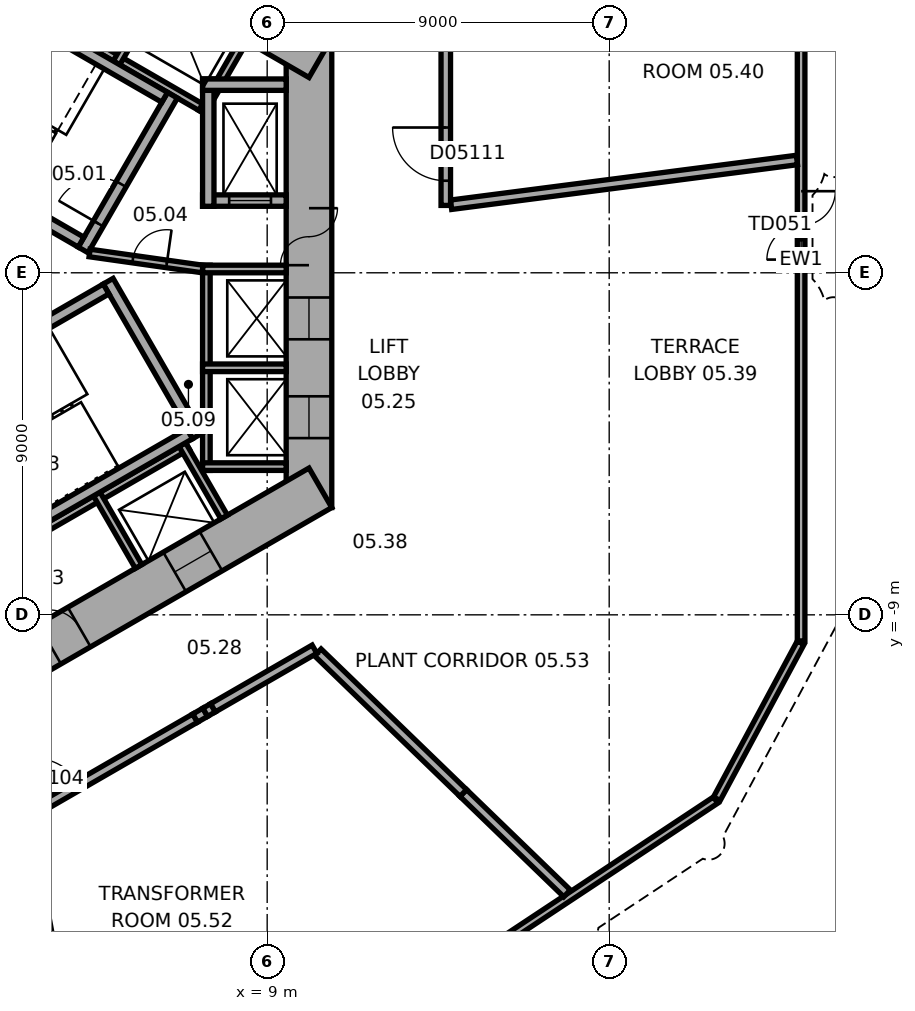
"""IFC4 building model, lengths in metres.
Left out: names, types, materials, properties, quantities, classifications, styles, units other than length and angle.
Written with IfcOpenShell. Run it as: python <this file> out.ifc"""

import sys

from ifc_helpers import new_model, si_unit, direction, frame, frame_2d, origin, place, context, subcontext, project, spatial, rectangle, extrude, element, fill, save


model = new_model("IFC4")
c1 = context("Model", 3, precision=1e-05, world=origin(), true_north=direction((0.0, 1.0)))
c2 = subcontext(c1, "Body", "Model", "MODEL_VIEW")
j1 = project(units=[si_unit("LENGTHUNIT", "METRE"), si_unit("PLANEANGLEUNIT", "RADIAN")], contexts=[c1])
p1 = place(None, origin())
s1 = spatial("IfcSite", under=j1, at=p1, CompositionType="ELEMENT")
p2 = place(p1, origin())
s2 = spatial("IfcBuilding", under=s1, at=p2, CompositionType="ELEMENT")
p3 = place(p2, frame((0.0, 0.0, 34.5)))
s3 = spatial("IfcBuildingStorey", under=s2, at=p3, CompositionType="ELEMENT", Elevation=34.5)
p4 = place(p3, frame((10.1, -6.177, 0.0), z_axis=(0.0, 0.0, 1.0), x_axis=(0.0, 1.0, 0.0)))
e1 = element("IfcWall", 1, at=p4, inside=s3, PredefinedType="SHEAR", context=c2, shape_type="SweptSolid", body=[
    extrude(rectangle(XDim=12.355, YDim=1.2, at=frame_2d((6.177, 0.0))), origin(), (0.0, 0.0, 1.0), 4.5),
])
p5 = place(p4, frame((6.378, 0.0, 0.0)))
e2 = element("IfcOpeningElement", 2, at=p5, cuts=e1, PredefinedType="OPENING", context=c2, shape_type="SweptSolid", body=[
    extrude(rectangle(XDim=1.5, YDim=2.1, at=frame_2d((0.75, 1.05))), frame((0.0, 0.61, 0.0), z_axis=(0.0, -1.0, 0.0), x_axis=(1.0, 0.0, 0.0)), (0.0, 0.0, 1.0), 1.22),
])
p6 = place(p4, frame((1.828, 0.0, 0.0)))
e3 = element("IfcOpeningElement", 3, at=p6, cuts=e1, PredefinedType="OPENING", context=c2, shape_type="SweptSolid", body=[
    extrude(rectangle(XDim=1.1, YDim=2.1, at=frame_2d((0.55, 1.05))), frame((0.0, 0.61, 0.0), z_axis=(0.0, -1.0, 0.0), x_axis=(1.0, 0.0, 0.0)), (0.0, 0.0, 1.0), 1.22),
])
p7 = place(p4, frame((4.427, 0.0, 0.0)))
e4 = element("IfcOpeningElement", 4, at=p7, cuts=e1, PredefinedType="OPENING", context=c2, shape_type="SweptSolid", body=[
    extrude(rectangle(XDim=1.1, YDim=2.1, at=frame_2d((0.55, 1.05))), frame((0.0, 0.61, 0.0), z_axis=(0.0, -1.0, 0.0), x_axis=(1.0, 0.0, 0.0)), (0.0, 0.0, 1.0), 1.22),
])
p8 = place(p3, frame((10.4, 5.658, 0.0), z_axis=(0.0, 0.0, 1.0), x_axis=(-0.866021384402, 0.500006961711, 0.0)))
e5 = element("IfcWall", 5, at=p8, inside=s3, PredefinedType="SHEAR", context=c2, shape_type="SweptSolid", body=[
    extrude(rectangle(XDim=12.355, YDim=1.2, at=frame_2d((6.178, 0.0))), origin(), (0.0, 0.0, 1.0), 4.5),
])
p9 = place(p8, frame((2.728, 0.0, 0.0)))
e6 = element("IfcOpeningElement", 6, at=p9, cuts=e5, PredefinedType="OPENING", context=c2, shape_type="SweptSolid", body=[
    extrude(rectangle(XDim=1.1, YDim=2.1, at=frame_2d((0.55, 1.05))), frame((0.0, 0.61, 0.0), z_axis=(0.0, -1.0, 0.0), x_axis=(1.0, 0.0, 0.0)), (0.0, 0.0, 1.0), 1.22),
])
p10 = place(p8, frame((5.328, 0.0, 0.0)))
e7 = element("IfcOpeningElement", 7, at=p10, cuts=e5, PredefinedType="OPENING", context=c2, shape_type="SweptSolid", body=[
    extrude(rectangle(XDim=1.1, YDim=2.1, at=frame_2d((0.55, 1.05))), frame((0.0, 0.61, 0.0), z_axis=(0.0, -1.0, 0.0), x_axis=(1.0, 0.0, 0.0)), (0.0, 0.0, 1.0), 1.22),
])
p11 = place(p8, frame((7.928, 0.0, 0.0)))
e8 = element("IfcOpeningElement", 8, at=p11, cuts=e5, PredefinedType="OPENING", context=c2, shape_type="SweptSolid", body=[
    extrude(rectangle(XDim=1.1, YDim=2.1, at=frame_2d((0.55, 1.05))), frame((0.0, 0.61, 0.0), z_axis=(0.0, -1.0, 0.0), x_axis=(1.0, 0.0, 0.0)), (0.0, 0.0, 1.0), 1.22),
])
p12 = place(p3, frame((-0.3, -11.836, 0.0), z_axis=(0.0, 0.0, 1.0), x_axis=(0.866021384402, 0.500006961711, 0.0)))
e9 = element("IfcWall", 9, at=p12, inside=s3, PredefinedType="SHEAR", context=c2, shape_type="SweptSolid", body=[
    extrude(rectangle(XDim=12.355, YDim=1.2, at=frame_2d((6.178, 0.0))), origin(), (0.0, 0.0, 1.0), 4.5),
])
p13 = place(p12, frame((4.128, 0.0, 0.0)))
e10 = element("IfcOpeningElement", 10, at=p13, cuts=e9, PredefinedType="OPENING", context=c2, shape_type="SweptSolid", body=[
    extrude(rectangle(XDim=0.9, YDim=2.1, at=frame_2d((0.45, 1.05))), frame((0.0, 0.61, 0.0), z_axis=(0.0, -1.0, 0.0), x_axis=(1.0, 0.0, 0.0)), (0.0, 0.0, 1.0), 1.22),
])
p14 = place(p12, frame((7.928, 0.0, 0.0)))
e11 = element("IfcOpeningElement", 11, at=p14, cuts=e9, PredefinedType="OPENING", context=c2, shape_type="SweptSolid", body=[
    extrude(rectangle(XDim=1.1, YDim=2.1, at=frame_2d((0.55, 1.05))), frame((0.0, 0.61, 0.0), z_axis=(0.0, -1.0, 0.0), x_axis=(1.0, 0.0, 0.0)), (0.0, 0.0, 1.0), 1.22),
])
p15 = place(p3, frame((23.05, -9.687, 0.0), z_axis=(0.0, 0.0, 1.0), x_axis=(0.0, 1.0, 0.0)))
e12 = element("IfcWall", 12, at=p15, inside=s3, PredefinedType="STANDARD", context=c2, shape_type="SweptSolid", body=[
    extrude(rectangle(XDim=21.246, YDim=0.2, at=frame_2d((10.623, 0.0))), origin(), (0.0, 0.0, 1.0), 4.5),
])
p16 = place(p15, frame((10.034, 0.0, 0.0)))
e13 = element("IfcOpeningElement", 13, at=p16, cuts=e12, PredefinedType="OPENING", context=c2, shape_type="SweptSolid", body=[
    extrude(rectangle(XDim=1.8, YDim=2.4, at=frame_2d((0.9, 1.2))), frame((0.0, 0.11, 0.0), z_axis=(0.0, -1.0, 0.0), x_axis=(1.0, 0.0, 0.0)), (0.0, 0.0, 1.0), 0.22),
])
p17 = place(p3, frame((3.083, -25.601, 0.0), z_axis=(0.0, 0.0, 1.0), x_axis=(0.833884295743, 0.551939291329, 0.0)))
e14 = element("IfcWall", 14, at=p17, inside=s3, PredefinedType="STANDARD", context=c2, shape_type="SweptSolid", body=[
    extrude(rectangle(XDim=21.246, YDim=0.2, at=frame_2d((10.623, 0.0))), origin(), (0.0, 0.0, 1.0), 4.5),
])
p18 = place(p3, frame((20.833, -13.839, 0.0), z_axis=(0.0, 0.0, 1.0), x_axis=(0.473321668581, 0.880889662813, 0.0)))
e15 = element("IfcWall", 15, at=p18, inside=s3, PredefinedType="STANDARD", context=c2, shape_type="SweptSolid", body=[
    extrude(rectangle(XDim=4.66, YDim=0.2, at=frame_2d((2.33, 0.0))), origin(), (0.0, 0.0, 1.0), 4.5),
])
p19 = place(p3, frame((7.4, -5.2, 0.0), z_axis=(0.0, 0.0, 1.0), x_axis=(0.0, 1.0, 0.0)))
e16 = element("IfcWall", 16, at=p19, inside=s3, PredefinedType="PARTITIONING", context=c2, shape_type="SweptSolid", body=[
    extrude(rectangle(XDim=5.4, YDim=0.2, at=frame_2d((2.7, 0.0))), origin(), (0.0, 0.0, 1.0), 4.2),
])
for number, where, z_axis, x_axis in (
    (17, (7.3, -5.1, 0.0), (0.0, 0.0, 1.0), (1.0, 0.0, 0.0)),
    (18, (7.3, -2.5, 0.0), (0.0, 0.0, 1.0), (1.0, 0.0, 0.0)),
    (19, (7.3, 0.1, 0.0), (0.0, 0.0, 1.0), (1.0, 0.0, 0.0)),
):
    element("IfcWall", number, at=place(p3, frame(where, z_axis=z_axis, x_axis=x_axis)), inside=s3, PredefinedType="PARTITIONING", context=c2, shape_type="SweptSolid", body=[
        extrude(rectangle(XDim=2.2, YDim=0.2, at=frame_2d((1.1, 0.0))), origin(), (0.0, 0.0, 1.0), 4.2),
    ])
p20 = place(p3, frame((7.424, 4.259, 0.0), z_axis=(0.0, 0.0, 1.0), x_axis=(-0.866026010844, 0.49999894854, 0.0)))
e20 = element("IfcWall", 20, at=p20, inside=s3, PredefinedType="PARTITIONING", context=c2, shape_type="SweptSolid", body=[
    extrude(rectangle(XDim=8.0, YDim=0.2, at=frame_2d((4.0, 0.0))), origin(), (0.0, 0.0, 1.0), 4.2),
])
for number, where, z_axis, x_axis in (
    (21, (7.287, 4.222, 0.0), (0.0, 0.0, 1.0), (0.5, 0.866, 0.0)),
    (22, (5.036, 5.522, 0.0), (0.0, 0.0, 1.0), (0.5, 0.866, 0.0)),
):
    element("IfcWall", number, at=place(p3, frame(where, z_axis=z_axis, x_axis=x_axis)), inside=s3, PredefinedType="PARTITIONING", context=c2, shape_type="SweptSolid", body=[
        extrude(rectangle(XDim=2.2, YDim=0.2, at=frame_2d((1.1, 0.0))), origin(), (0.0, 0.0, 1.0), 4.2),
    ])
p21 = place(p3, frame((-0.024, -8.559, 0.0), z_axis=(0.0, 0.0, 1.0), x_axis=(0.866026010844, 0.49999894854, 0.0)))
e23 = element("IfcWall", 23, at=p21, inside=s3, PredefinedType="PARTITIONING", context=c2, shape_type="SweptSolid", body=[
    extrude(rectangle(XDim=8.0, YDim=0.2, at=frame_2d((4.0, 0.0))), origin(), (0.0, 0.0, 1.0), 4.2),
])
for number, where, z_axis, x_axis in (
    (24, (4.516, -5.822, 0.0), (0.0, 0.0, 1.0), (0.5, -0.866, 0.0)),
    (25, (6.768, -4.522, 0.0), (0.0, 0.0, 1.0), (0.5, -0.866, 0.0)),
):
    element("IfcWall", number, at=place(p3, frame(where, z_axis=z_axis, x_axis=x_axis)), inside=s3, PredefinedType="PARTITIONING", context=c2, shape_type="SweptSolid", body=[
        extrude(rectangle(XDim=2.2, YDim=0.2, at=frame_2d((1.1, 0.0))), origin(), (0.0, 0.0, 1.0), 4.2),
    ])
p22 = place(p3, frame((4.158, 0.602, 0.0), z_axis=(0.0, 0.0, 1.0), x_axis=(0.499977259774, 0.866038532462, 0.0)))
e26 = element("IfcWall", 26, at=p22, inside=s3, PredefinedType="SHEAR", context=c2, shape_type="SweptSolid", body=[
    extrude(rectangle(XDim=4.7, YDim=0.3, at=frame_2d((2.35, 0.0))), origin(), (0.0, 0.0, 1.0), 4.2),
])
p23 = place(p22, frame((0.8, 0.0, 0.0)))
e27 = element("IfcOpeningElement", 27, at=p23, cuts=e26, PredefinedType="OPENING", context=c2, shape_type="SweptSolid", body=[
    extrude(rectangle(XDim=1.2, YDim=2.1, at=frame_2d((0.6, 1.05))), frame((0.0, 0.16, 0.0), z_axis=(0.0, -1.0, 0.0), x_axis=(1.0, 0.0, 0.0)), (0.0, 0.0, 1.0), 0.32),
])
for number, where, z_axis, x_axis in (
    (28, (4.103, 0.807, 0.0), (0.0, 0.0, 1.0), (-0.866, 0.5, 0.0)),
    (29, (6.303, 4.617, 0.0), (0.0, 0.0, 1.0), (-0.866, 0.5, 0.0)),
):
    element("IfcWall", number, at=place(p3, frame(where, z_axis=z_axis, x_axis=x_axis)), inside=s3, PredefinedType="SHEAR", context=c2, shape_type="SweptSolid", body=[
        extrude(rectangle(XDim=7.06, YDim=0.3, at=frame_2d((3.53, 0.0))), origin(), (0.0, 0.0, 1.0), 4.2),
    ])
p24 = place(p3, frame((4.816, -0.222, 0.0), z_axis=(0.0, 0.0, 1.0), x_axis=(0.499977259774, -0.866038532462, 0.0)))
e30 = element("IfcWall", 30, at=p24, inside=s3, PredefinedType="SHEAR", context=c2, shape_type="SweptSolid", body=[
    extrude(rectangle(XDim=4.7, YDim=0.3, at=frame_2d((2.35, 0.0))), origin(), (0.0, 0.0, 1.0), 4.2),
])
for number, where, z_axis, x_axis in (
    (31, (-1.353, -3.957, 0.0), (0.0, 0.0, 1.0), (0.866, 0.5, 0.0)),
    (32, (0.847, -7.767, 0.0), (0.0, 0.0, 1.0), (0.866, 0.5, 0.0)),
):
    element("IfcWall", number, at=place(p3, frame(where, z_axis=z_axis, x_axis=x_axis)), inside=s3, PredefinedType="SHEAR", context=c2, shape_type="SweptSolid", body=[
        extrude(rectangle(XDim=7.06, YDim=0.3, at=frame_2d((3.53, 0.0))), origin(), (0.0, 0.0, 1.0), 4.2),
    ])
p25 = place(p3, frame((7.3, 1.9, 0.0), z_axis=(0.0, 0.0, 1.0), x_axis=(1.0, 0.0, 0.0)))
e33 = element("IfcWall", 33, at=p25, inside=s3, PredefinedType="SHEAR", context=c2, shape_type="SweptSolid", body=[
    extrude(rectangle(XDim=2.2, YDim=0.3, at=frame_2d((1.1, 0.0))), origin(), (0.0, 0.0, 1.0), 4.2),
])
p26 = place(p25, frame((0.7, 0.0, 0.0)))
e34 = element("IfcOpeningElement", 34, at=p26, cuts=e33, PredefinedType="OPENING", context=c2, shape_type="SweptSolid", body=[
    extrude(rectangle(XDim=1.1, YDim=2.1, at=frame_2d((0.55, 1.05))), frame((0.0, 0.16, 0.0), z_axis=(0.0, -1.0, 0.0), x_axis=(1.0, 0.0, 0.0)), (0.0, 0.0, 1.0), 0.32),
])
p27 = place(p3, frame((7.45, 1.75, 0.0), z_axis=(0.0, 0.0, 1.0), x_axis=(0.0, 1.0, 0.0)))
e35 = element("IfcWall", 35, at=p27, inside=s3, PredefinedType="SHEAR", context=c2, shape_type="SweptSolid", body=[
    extrude(rectangle(XDim=3.35, YDim=0.3, at=frame_2d((1.675, 0.0))), origin(), (0.0, 0.0, 1.0), 4.2),
])
p28 = place(p3, frame((7.3, 4.95, 0.0), z_axis=(0.0, 0.0, 1.0), x_axis=(1.0, 0.0, 0.0)))
e36 = element("IfcWall", 36, at=p28, inside=s3, PredefinedType="SHEAR", context=c2, shape_type="SweptSolid", body=[
    extrude(rectangle(XDim=2.2, YDim=0.3, at=frame_2d((1.1, 0.0))), origin(), (0.0, 0.0, 1.0), 4.2),
])
p29 = place(p3, frame((4.327, 0.521, 0.0), z_axis=(0.0, 0.0, 1.0), x_axis=(0.990124376366, -0.14019172346, 0.0)))
e37 = element("IfcWall", 37, at=p29, inside=s3, PredefinedType="PARTITIONING", context=c2, shape_type="SweptSolid", body=[
    extrude(rectangle(XDim=3.002, YDim=0.2, at=frame_2d((1.501, 0.0))), origin(), (0.0, 0.0, 1.0), 4.2),
])
p30 = place(p29, frame((1.15, 0.0, 0.0)))
e38 = element("IfcOpeningElement", 38, at=p30, cuts=e37, PredefinedType="OPENING", context=c2, shape_type="SweptSolid", body=[
    extrude(rectangle(XDim=0.9, YDim=2.1, at=frame_2d((0.45, 1.05))), frame((0.0, 0.11, 0.0), z_axis=(0.0, -1.0, 0.0), x_axis=(1.0, 0.0, 0.0)), (0.0, 0.0, 1.0), 0.22),
])
p31 = place(p3, frame((2.675, -14.471, 0.0), z_axis=(0.0, 0.0, 1.0), x_axis=(0.181757015391, -0.983343473745, 0.0)))
e39 = element("IfcWall", 39, at=p31, inside=s3, PredefinedType="SOLIDWALL", context=c2, shape_type="SweptSolid", body=[
    extrude(rectangle(XDim=10.21, YDim=0.25, at=frame_2d((5.105, 0.0))), origin(), (0.0, 0.0, 1.0), 4.2),
])
p32 = place(p3, frame((2.642, -14.294, 0.0), z_axis=(0.0, 0.0, 1.0), x_axis=(0.866004128649, 0.500036847806, 0.0)))
e40 = element("IfcWall", 40, at=p32, inside=s3, PredefinedType="SOLIDWALL", context=c2, shape_type="SweptSolid", body=[
    extrude(rectangle(XDim=5.153, YDim=0.25, at=frame_2d((2.577, 0.0))), origin(), (0.0, 0.0, 1.0), 4.2),
])
p33 = place(p32, frame((0.25, 0.0, 0.0)))
e41 = element("IfcOpeningElement", 41, at=p33, cuts=e40, PredefinedType="OPENING", context=c2, shape_type="SweptSolid", body=[
    extrude(rectangle(XDim=1.4, YDim=2.1, at=frame_2d((0.7, 1.05))), frame((0.0, 0.135, 0.0), z_axis=(0.0, -1.0, 0.0), x_axis=(1.0, 0.0, 0.0)), (0.0, 0.0, 1.0), 0.27),
])
p34 = place(p3, frame((14.16, -13.688, 0.0), z_axis=(0.0, 0.0, 1.0), x_axis=(0.718925227395, -0.695087417103, 0.0)))
e42 = element("IfcWall", 42, at=p34, inside=s3, PredefinedType="SOLIDWALL", context=c2, shape_type="SweptSolid", body=[
    extrude(rectangle(XDim=3.8, YDim=0.25, at=frame_2d((1.9, 0.0))), origin(), (0.0, 0.0, 1.0), 3.4),
])
p35 = place(p3, frame((7.105, -11.717, 0.0), z_axis=(0.0, 0.0, 1.0), x_axis=(0.866119007285, 0.499837838923, 0.0)))
e43 = element("IfcWall", 43, at=p35, inside=s3, PredefinedType="SOLIDWALL", context=c2, shape_type="SweptSolid", body=[
    extrude(rectangle(XDim=0.305, YDim=0.25, at=frame_2d((0.153, 0.0))), origin(), (0.0, 0.0, 1.0), 4.2),
])
p36 = place(p3, frame((7.575, -11.446, 0.0), z_axis=(0.0, 0.0, 1.0), x_axis=(-0.86608282171, -0.499900536046, 0.0)))
e44 = element("IfcWall", 44, at=p36, inside=s3, PredefinedType="SOLIDWALL", context=c2, shape_type="SweptSolid", body=[
    extrude(rectangle(XDim=0.237, YDim=0.25, at=frame_2d((0.119, 0.0))), origin(), (0.0, 0.0, 1.0), 4.2),
])
p37 = place(p3, frame((10.332, -9.987, 0.0), z_axis=(0.0, 0.0, 1.0), x_axis=(0.718927275113, -0.695085299153, 0.0)))
e45 = element("IfcWall", 45, at=p37, inside=s3, PredefinedType="SOLIDWALL", context=c2, shape_type="SweptSolid", body=[
    extrude(rectangle(XDim=5.325, YDim=0.25, at=frame_2d((2.662, 0.0))), origin(), (0.0, 0.0, 1.0), 3.4),
])
p38 = place(p3, frame((10.246, -9.904, 0.0), z_axis=(0.0, 0.0, 1.0), x_axis=(-0.866047158059, -0.499962318598, 0.0)))
e46 = element("IfcWall", 46, at=p38, inside=s3, PredefinedType="SOLIDWALL", context=c2, shape_type="SweptSolid", body=[
    extrude(rectangle(XDim=3.084, YDim=0.25, at=frame_2d((1.542, 0.0))), origin(), (0.0, 0.0, 1.0), 4.2),
])
p39 = place(p3, frame((13.839, 1.791, 0.0), z_axis=(0.0, 0.0, 1.0), x_axis=(0.991734131904, 0.128309826658, 0.0)))
e47 = element("IfcWall", 47, at=p39, inside=s3, PredefinedType="SOLIDWALL", context=c2, shape_type="SweptSolid", body=[
    extrude(rectangle(XDim=9.177, YDim=0.25, at=frame_2d((4.588, 0.0))), origin(), (0.0, 0.0, 1.0), 4.2),
])
p40 = place(p3, frame((13.7, 6.071, 0.0), z_axis=(0.0, 0.0, 1.0), x_axis=(0.0, -1.0, 0.0)))
e48 = element("IfcWall", 48, at=p40, inside=s3, PredefinedType="SOLIDWALL", context=c2, shape_type="SweptSolid", body=[
    extrude(rectangle(XDim=4.298, YDim=0.25, at=frame_2d((2.149, 0.0))), origin(), (0.0, 0.0, 1.0), 4.2),
])
p41 = place(p40, frame((2.248, 0.0, 0.0)))
e49 = element("IfcOpeningElement", 49, at=p41, cuts=e48, PredefinedType="OPENING", context=c2, shape_type="SweptSolid", body=[
    extrude(rectangle(XDim=1.4, YDim=2.1, at=frame_2d((0.7, 1.05))), frame((0.0, 0.135, 0.0), z_axis=(0.0, -1.0, 0.0), x_axis=(1.0, 0.0, 0.0)), (0.0, 0.0, 1.0), 0.27),
])
p42 = place(p16, origin())
e50 = element("IfcDoor", 50, at=p42, inside=s3, OperationType="DOUBLE_DOOR_DOUBLE_SWING", PredefinedType="DOOR", context=c2, shape_type="SweptSolid", body=[
    extrude(rectangle(XDim=1.8, YDim=2.4, at=frame_2d((0.9, 1.2))), frame((0.0, 0.025, 0.0), z_axis=(0.0, -1.0, 0.0), x_axis=(1.0, 0.0, 0.0)), (0.0, 0.0, 1.0), 0.05),
])
fill(e13, e50)
p43 = place(p5, origin())
e51 = element("IfcDoor", 51, at=p43, inside=s3, OperationType="DOUBLE_DOOR_SINGLE_SWING", PredefinedType="DOOR", context=c2, shape_type="SweptSolid", body=[
    extrude(rectangle(XDim=1.5, YDim=2.1, at=frame_2d((0.75, 1.05))), frame((0.0, 0.025, 0.0), z_axis=(0.0, -1.0, 0.0), x_axis=(1.0, 0.0, 0.0)), (0.0, 0.0, 1.0), 0.05),
])
fill(e2, e51)
p44 = place(p23, origin())
e52 = element("IfcDoor", 52, at=p44, inside=s3, OperationType="SINGLE_SWING_RIGHT", PredefinedType="DOOR", context=c2, shape_type="SweptSolid", body=[
    extrude(rectangle(XDim=1.2, YDim=2.1, at=frame_2d((0.6, 1.05))), frame((0.0, 0.025, 0.0), z_axis=(0.0, -1.0, 0.0), x_axis=(1.0, 0.0, 0.0)), (0.0, 0.0, 1.0), 0.05),
])
fill(e27, e52)
p45 = place(p30, origin())
e53 = element("IfcDoor", 53, at=p45, inside=s3, OperationType="SINGLE_SWING_LEFT", PredefinedType="DOOR", context=c2, shape_type="SweptSolid", body=[
    extrude(rectangle(XDim=0.9, YDim=2.1, at=frame_2d((0.45, 1.05))), frame((0.0, 0.025, 0.0), z_axis=(0.0, -1.0, 0.0), x_axis=(1.0, 0.0, 0.0)), (0.0, 0.0, 1.0), 0.05),
])
fill(e38, e53)
p46 = place(p13, origin())
e54 = element("IfcDoor", 54, at=p46, inside=s3, OperationType="SINGLE_SWING_LEFT", PredefinedType="DOOR", context=c2, shape_type="SweptSolid", body=[
    extrude(rectangle(XDim=0.9, YDim=2.1, at=frame_2d((0.45, 1.05))), frame((0.0, 0.025, 0.0), z_axis=(0.0, -1.0, 0.0), x_axis=(1.0, 0.0, 0.0)), (0.0, 0.0, 1.0), 0.05),
])
fill(e10, e54)
p47 = place(p26, origin())
e55 = element("IfcDoor", 55, at=p47, inside=s3, OperationType="DOUBLE_DOOR_SLIDING", PredefinedType="DOOR", context=c2, shape_type="SweptSolid", body=[
    extrude(rectangle(XDim=1.1, YDim=2.1, at=frame_2d((0.55, 1.05))), frame((0.0, 0.025, 0.0), z_axis=(0.0, -1.0, 0.0), x_axis=(1.0, 0.0, 0.0)), (0.0, 0.0, 1.0), 0.05),
])
fill(e34, e55)
p48 = place(p6, origin())
e56 = element("IfcDoor", 56, at=p48, inside=s3, OperationType="DOUBLE_DOOR_SLIDING", PredefinedType="DOOR", context=c2, shape_type="SweptSolid", body=[
    extrude(rectangle(XDim=1.1, YDim=2.1, at=frame_2d((0.55, 1.05))), frame((0.0, 0.025, 0.0), z_axis=(0.0, -1.0, 0.0), x_axis=(1.0, 0.0, 0.0)), (0.0, 0.0, 1.0), 0.05),
])
fill(e3, e56)
p49 = place(p7, origin())
e57 = element("IfcDoor", 57, at=p49, inside=s3, OperationType="DOUBLE_DOOR_SLIDING", PredefinedType="DOOR", context=c2, shape_type="SweptSolid", body=[
    extrude(rectangle(XDim=1.1, YDim=2.1, at=frame_2d((0.55, 1.05))), frame((0.0, 0.025, 0.0), z_axis=(0.0, -1.0, 0.0), x_axis=(1.0, 0.0, 0.0)), (0.0, 0.0, 1.0), 0.05),
])
fill(e4, e57)
p50 = place(p14, origin())
e58 = element("IfcDoor", 58, at=p50, inside=s3, OperationType="DOUBLE_DOOR_SLIDING", PredefinedType="DOOR", context=c2, shape_type="SweptSolid", body=[
    extrude(rectangle(XDim=1.1, YDim=2.1, at=frame_2d((0.55, 1.05))), frame((0.0, 0.025, 0.0), z_axis=(0.0, -1.0, 0.0), x_axis=(1.0, 0.0, 0.0)), (0.0, 0.0, 1.0), 0.05),
])
fill(e11, e58)
p51 = place(p33, origin())
e59 = element("IfcDoor", 59, at=p51, inside=s3, OperationType="SINGLE_SWING_LEFT", PredefinedType="DOOR", context=c2, shape_type="SweptSolid", body=[
    extrude(rectangle(XDim=1.4, YDim=2.1, at=frame_2d((0.7, 1.05))), frame((0.0, 0.025, 0.0), z_axis=(0.0, -1.0, 0.0), x_axis=(1.0, 0.0, 0.0)), (0.0, 0.0, 1.0), 0.05),
])
fill(e41, e59)
p52 = place(p41, origin())
e60 = element("IfcDoor", 60, at=p52, inside=s3, OperationType="SINGLE_SWING_LEFT", PredefinedType="DOOR", context=c2, shape_type="SweptSolid", body=[
    extrude(rectangle(XDim=1.4, YDim=2.1, at=frame_2d((0.7, 1.05))), frame((0.0, 0.025, 0.0), z_axis=(0.0, -1.0, 0.0), x_axis=(1.0, 0.0, 0.0)), (0.0, 0.0, 1.0), 0.05),
])
fill(e49, e60)
save(model, sys.argv[1])
